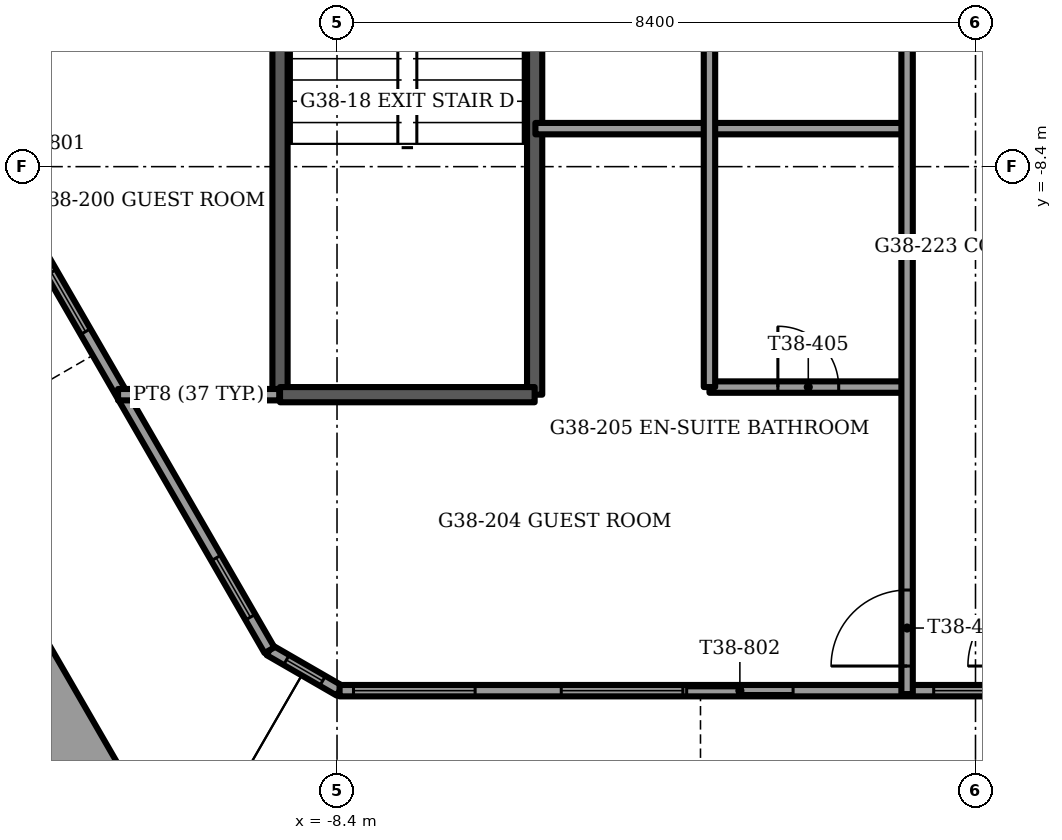
"""IFC4 building model, lengths in metres.
Left out: names, types, materials, properties, quantities, classifications, styles, units other than length and angle.
Written with IfcOpenShell. Run it as: python <this file> out.ifc"""

import sys

from ifc_helpers import new_model, si_unit, direction, frame, frame_2d, origin, place, context, subcontext, project, spatial, rectangle, extrude, element, fill, save


model = new_model("IFC4")
c1 = context("Model", 3, precision=1e-05, world=origin(), true_north=direction((0.0, 1.0)))
c2 = subcontext(c1, "Body", "Model", "MODEL_VIEW")
j1 = project(units=[si_unit("LENGTHUNIT", "METRE"), si_unit("PLANEANGLEUNIT", "RADIAN")], contexts=[c1])
p1 = place(None, origin())
s1 = spatial("IfcSite", under=j1, at=p1, CompositionType="ELEMENT")
p2 = place(p1, origin())
s2 = spatial("IfcBuilding", under=s1, at=p2, CompositionType="ELEMENT")
p3 = place(p2, frame((0.0, 0.0, 157.0)))
s3 = spatial("IfcBuildingStorey", under=s2, at=p3, CompositionType="ELEMENT", Elevation=157.0)
p4 = place(p3, frame((-13.847, -12.715, 0.0), z_axis=(0.0, 0.0, 1.0), x_axis=(0.499969679245, -0.866042908773, 0.0)))
e1 = element("IfcWall", 1, at=p4, inside=s3, PredefinedType="PARAPET", context=c2, shape_type="SweptSolid", body=[
    extrude(rectangle(XDim=5.813, YDim=0.9, at=frame_2d((2.906, 0.0))), origin(), (0.0, 0.0, 1.0), 1.1),
])
p5 = place(p3, frame((-17.428, -0.663, 0.0), z_axis=(0.0, 0.0, 1.0), x_axis=(0.499985985267, -0.866033495043, 0.0)))
e2 = element("IfcWall", 2, at=p5, inside=s3, PredefinedType="SOLIDWALL", context=c2, shape_type="SweptSolid", body=[
    extrude(rectangle(XDim=16.279, YDim=0.15, at=frame_2d((8.14, 0.0))), origin(), (0.0, 0.0, 1.0), 3.45),
])
p6 = place(p5, frame((2.14, 0.0, 0.15)))
e3 = element("IfcOpeningElement", 3, at=p6, cuts=e2, PredefinedType="OPENING", context=c2, shape_type="SweptSolid", body=[
    extrude(rectangle(XDim=0.9, YDim=2.85, at=frame_2d((0.45, 1.425))), frame((0.0, 0.075, 0.0), z_axis=(0.0, -1.0, 0.0), x_axis=(1.0, 0.0, 0.0)), (0.0, 0.0, 1.0), 0.15),
])
p7 = place(p5, frame((4.34, 0.0, 0.15)))
e4 = element("IfcOpeningElement", 4, at=p7, cuts=e2, PredefinedType="OPENING", context=c2, shape_type="SweptSolid", body=[
    extrude(rectangle(XDim=1.4, YDim=2.85, at=frame_2d((0.7, 1.425))), frame((0.0, 0.075, 0.0), z_axis=(0.0, -1.0, 0.0), x_axis=(1.0, 0.0, 0.0)), (0.0, 0.0, 1.0), 0.15),
])
p8 = place(p5, frame((6.833, 0.0, 0.15)))
e5 = element("IfcOpeningElement", 5, at=p8, cuts=e2, PredefinedType="OPENING", context=c2, shape_type="SweptSolid", body=[
    extrude(rectangle(XDim=1.6, YDim=2.85, at=frame_2d((0.8, 1.425))), frame((0.0, 0.075, 0.0), z_axis=(0.0, -1.0, 0.0), x_axis=(1.0, 0.0, 0.0)), (0.0, 0.0, 1.0), 0.15),
])
p9 = place(p5, frame((8.54, 0.0, 0.0)))
e6 = element("IfcOpeningElement", 6, at=p9, cuts=e2, PredefinedType="OPENING", context=c2, shape_type="SweptSolid", body=[
    extrude(rectangle(XDim=1.4, YDim=2.4, at=frame_2d((0.7, 1.2))), frame((0.0, 0.075, 0.0), z_axis=(0.0, -1.0, 0.0), x_axis=(1.0, 0.0, 0.0)), (0.0, 0.0, 1.0), 0.15),
])
p10 = place(p5, frame((10.54, 0.0, 0.15)))
e7 = element("IfcOpeningElement", 7, at=p10, cuts=e2, PredefinedType="OPENING", context=c2, shape_type="SweptSolid", body=[
    extrude(rectangle(XDim=0.9, YDim=2.85, at=frame_2d((0.45, 1.425))), frame((0.0, 0.075, 0.0), z_axis=(0.0, -1.0, 0.0), x_axis=(1.0, 0.0, 0.0)), (0.0, 0.0, 1.0), 0.15),
])
p11 = place(p5, frame((14.877, 0.0, 0.15)))
e8 = element("IfcOpeningElement", 8, at=p11, cuts=e2, PredefinedType="OPENING", context=c2, shape_type="SweptSolid", body=[
    extrude(rectangle(XDim=0.9, YDim=2.73, at=frame_2d((0.45, 1.365))), frame((0.0, 0.075, 0.0), z_axis=(0.0, -1.0, 0.0), x_axis=(1.0, 0.0, 0.0)), (0.0, 0.0, 1.0), 0.15),
])
p12 = place(p3, frame((-8.366, -15.294, 0.0), z_axis=(0.0, 0.0, 1.0), x_axis=(1.0, 0.0, 0.0)))
e9 = element("IfcWall", 9, at=p12, inside=s3, PredefinedType="SOLIDWALL", context=c2, shape_type="SweptSolid", body=[
    extrude(rectangle(XDim=16.732, YDim=0.15, at=frame_2d((8.366, 0.0))), origin(), (0.0, 0.0, 1.0), 3.45),
])
p13 = place(p12, frame((2.916, 0.0, 0.15)))
e10 = element("IfcOpeningElement", 10, at=p13, cuts=e9, PredefinedType="OPENING", context=c2, shape_type="SweptSolid", body=[
    extrude(rectangle(XDim=1.6, YDim=2.85, at=frame_2d((0.8, 1.425))), frame((0.0, 0.075, 0.0), z_axis=(0.0, -1.0, 0.0), x_axis=(1.0, 0.0, 0.0)), (0.0, 0.0, 1.0), 0.15),
])
p14 = place(p12, frame((4.566, 0.0, 0.0)))
e11 = element("IfcOpeningElement", 11, at=p14, cuts=e9, PredefinedType="OPENING", context=c2, shape_type="SweptSolid", body=[
    extrude(rectangle(XDim=1.4, YDim=2.4, at=frame_2d((0.7, 1.2))), frame((0.0, 0.075, 0.0), z_axis=(0.0, -1.0, 0.0), x_axis=(1.0, 0.0, 0.0)), (0.0, 0.0, 1.0), 0.15),
])
p15 = place(p12, frame((7.816, 0.0, 0.15)))
e12 = element("IfcOpeningElement", 12, at=p15, cuts=e9, PredefinedType="OPENING", context=c2, shape_type="SweptSolid", body=[
    extrude(rectangle(XDim=0.9, YDim=2.85, at=frame_2d((0.45, 1.425))), frame((0.0, 0.075, 0.0), z_axis=(0.0, -1.0, 0.0), x_axis=(1.0, 0.0, 0.0)), (0.0, 0.0, 1.0), 0.15),
])
p16 = place(p12, frame((10.766, 0.0, 0.15)))
e13 = element("IfcOpeningElement", 13, at=p16, cuts=e9, PredefinedType="OPENING", context=c2, shape_type="SweptSolid", body=[
    extrude(rectangle(XDim=0.9, YDim=2.85, at=frame_2d((0.45, 1.425))), frame((0.0, 0.075, 0.0), z_axis=(0.0, -1.0, 0.0), x_axis=(1.0, 0.0, 0.0)), (0.0, 0.0, 1.0), 0.15),
])
p17 = place(p12, frame((11.866, 0.0, 0.0)))
e14 = element("IfcOpeningElement", 14, at=p17, cuts=e9, PredefinedType="OPENING", context=c2, shape_type="SweptSolid", body=[
    extrude(rectangle(XDim=1.4, YDim=2.4, at=frame_2d((0.7, 1.2))), frame((0.0, 0.075, 0.0), z_axis=(0.0, -1.0, 0.0), x_axis=(1.0, 0.0, 0.0)), (0.0, 0.0, 1.0), 0.15),
])
p18 = place(p12, frame((0.183, 0.0, 0.15)))
e15 = element("IfcOpeningElement", 15, at=p18, cuts=e9, PredefinedType="OPENING", context=c2, shape_type="SweptSolid", body=[
    extrude(rectangle(XDim=1.6, YDim=2.73, at=frame_2d((0.8, 1.365))), frame((0.0, 0.075, 0.0), z_axis=(0.0, -1.0, 0.0), x_axis=(1.0, 0.0, 0.0)), (0.0, 0.0, 1.0), 0.15),
])
p19 = place(p12, frame((14.949, 0.0, 0.15)))
e16 = element("IfcOpeningElement", 16, at=p19, cuts=e9, PredefinedType="OPENING", context=c2, shape_type="SweptSolid", body=[
    extrude(rectangle(XDim=1.6, YDim=2.73, at=frame_2d((0.8, 1.365))), frame((0.0, 0.075, 0.0), z_axis=(0.0, -1.0, 0.0), x_axis=(1.0, 0.0, 0.0)), (0.0, 0.0, 1.0), 0.15),
])
p20 = place(p3, frame((-9.289, -14.762, 0.0), z_axis=(0.0, 0.0, 1.0), x_axis=(0.866105447774, -0.499861334108, 0.0)))
e17 = element("IfcWall", 17, at=p20, inside=s3, PredefinedType="SOLIDWALL", context=c2, shape_type="SweptSolid", body=[
    extrude(rectangle(XDim=1.065, YDim=0.15, at=frame_2d((0.533, 0.0))), origin(), (0.0, 0.0, 1.0), 3.45),
])
p21 = place(p20, frame((0.258, 0.0, 0.15)))
e18 = element("IfcOpeningElement", 18, at=p21, cuts=e17, PredefinedType="OPENING", context=c2, shape_type="SweptSolid", body=[
    extrude(rectangle(XDim=0.55, YDim=2.85, at=frame_2d((0.275, 1.425))), frame((0.0, 0.075, 0.0), z_axis=(0.0, -1.0, 0.0), x_axis=(1.0, 0.0, 0.0)), (0.0, 0.0, 1.0), 0.15),
])
for number, where, z_axis, x_axis in (
    (19, (-9.15, -3.7, -0.3), (0.0, 0.0, 1.0), (0.0, -1.0, 0.0)),
    (20, (-5.8, -3.7, -0.3), (0.0, 0.0, 1.0), (0.0, -1.0, 0.0)),
):
    element("IfcWall", number, at=place(p3, frame(where, z_axis=z_axis, x_axis=x_axis)), inside=s3, PredefinedType="SOLIDWALL", context=c2, shape_type="SweptSolid", body=[
        extrude(rectangle(XDim=7.7, YDim=0.2, at=frame_2d((3.85, 0.0))), origin(), (0.0, 0.0, 1.0), 3.75),
    ])
p22 = place(p3, frame((-9.15, -11.4, -0.3), z_axis=(0.0, 0.0, 1.0), x_axis=(1.0, 0.0, 0.0)))
e21 = element("IfcWall", 21, at=p22, inside=s3, PredefinedType="SOLIDWALL", context=c2, shape_type="SweptSolid", body=[
    extrude(rectangle(XDim=3.35, YDim=0.2, at=frame_2d((1.675, 0.0))), origin(), (0.0, 0.0, 1.0), 3.75),
])
p23 = place(p3, frame((-11.281, -11.4, 0.0), z_axis=(0.0, 0.0, 1.0), x_axis=(1.0, 0.0, 0.0)))
e22 = element("IfcWall", 22, at=p23, inside=s3, PredefinedType="PARTITIONING", context=c2, shape_type="SweptSolid", body=[
    extrude(rectangle(XDim=2.121, YDim=0.15, at=frame_2d((1.061, 0.0))), origin(), (0.0, 0.0, 1.0), 3.45),
])
p24 = place(p3, frame((-3.5, -11.3, 0.0), z_axis=(0.0, 0.0, 1.0), x_axis=(1.0, 0.0, 0.0)))
e23 = element("IfcWall", 23, at=p24, inside=s3, PredefinedType="PARTITIONING", context=c2, shape_type="SweptSolid", body=[
    extrude(rectangle(XDim=2.6, YDim=0.15, at=frame_2d((1.3, 0.0))), origin(), (0.0, 0.0, 1.0), 3.45),
])
p25 = place(p24, frame((0.9, 0.0, 0.0)))
e24 = element("IfcOpeningElement", 24, at=p25, cuts=e23, PredefinedType="OPENING", context=c2, shape_type="SweptSolid", body=[
    extrude(rectangle(XDim=0.8, YDim=2.1, at=frame_2d((0.4, 1.05))), frame((0.0, 0.075, 0.0), z_axis=(0.0, -1.0, 0.0), x_axis=(1.0, 0.0, 0.0)), (0.0, 0.0, 1.0), 0.15),
])
p26 = place(p3, frame((-5.79, -7.9, 0.0), z_axis=(0.0, 0.0, 1.0), x_axis=(1.0, 0.0, 0.0)))
e25 = element("IfcWall", 25, at=p26, inside=s3, PredefinedType="PARTITIONING", context=c2, shape_type="SweptSolid", body=[
    extrude(rectangle(XDim=4.89, YDim=0.15, at=frame_2d((2.445, 0.0))), origin(), (0.0, 0.0, 1.0), 3.45),
])
p27 = place(p3, frame((-0.9, -15.339, 0.0), z_axis=(0.0, 0.0, 1.0), x_axis=(0.0, 1.0, 0.0)))
e26 = element("IfcWall", 26, at=p27, inside=s3, PredefinedType="PARTITIONING", context=c2, shape_type="SweptSolid", body=[
    extrude(rectangle(XDim=11.639, YDim=0.15, at=frame_2d((5.82, 0.0))), origin(), (0.0, 0.0, 1.0), 3.45),
])
p28 = place(p27, frame((10.389, 0.0, 0.0)))
e27 = element("IfcOpeningElement", 27, at=p28, cuts=e26, PredefinedType="OPENING", context=c2, shape_type="SweptSolid", body=[
    extrude(rectangle(XDim=1.0, YDim=2.1, at=frame_2d((0.5, 1.05))), frame((0.0, 0.075, 0.0), z_axis=(0.0, -1.0, 0.0), x_axis=(1.0, 0.0, 0.0)), (0.0, 0.0, 1.0), 0.15),
])
p29 = place(p27, frame((0.369, 0.0, 0.0)))
e28 = element("IfcOpeningElement", 28, at=p29, cuts=e26, PredefinedType="OPENING", context=c2, shape_type="SweptSolid", body=[
    extrude(rectangle(XDim=1.0, YDim=2.1, at=frame_2d((0.5, 1.05))), frame((0.0, 0.075, 0.0), z_axis=(0.0, -1.0, 0.0), x_axis=(1.0, 0.0, 0.0)), (0.0, 0.0, 1.0), 0.15),
])
p30 = place(p3, frame((-3.5, -11.3, 0.0), z_axis=(0.0, 0.0, 1.0), x_axis=(0.0, 1.0, 0.0)))
e29 = element("IfcWall", 29, at=p30, inside=s3, PredefinedType="PARTITIONING", context=c2, shape_type="SweptSolid", body=[
    extrude(rectangle(XDim=6.2, YDim=0.15, at=frame_2d((3.1, 0.0))), origin(), (0.0, 0.0, 1.0), 3.45),
])
p31 = place(p10, origin())
e30 = element("IfcWindow", 30, at=p31, inside=s3, PartitioningType="SINGLE_PANEL", PredefinedType="WINDOW", context=c2, shape_type="SweptSolid", body=[
    extrude(rectangle(XDim=0.9, YDim=2.85, at=frame_2d((0.45, 1.425))), frame((0.0, 0.03, 0.0), z_axis=(0.0, -1.0, 0.0), x_axis=(1.0, 0.0, 0.0)), (0.0, 0.0, 1.0), 0.06),
])
fill(e7, e30)
p32 = place(p11, origin())
e31 = element("IfcWindow", 31, at=p32, inside=s3, PartitioningType="SINGLE_PANEL", PredefinedType="WINDOW", context=c2, shape_type="SweptSolid", body=[
    extrude(rectangle(XDim=0.9, YDim=2.73, at=frame_2d((0.45, 1.365))), frame((0.0, 0.03, 0.0), z_axis=(0.0, -1.0, 0.0), x_axis=(1.0, 0.0, 0.0)), (0.0, 0.0, 1.0), 0.06),
])
fill(e8, e31)
p33 = place(p13, origin())
e32 = element("IfcWindow", 32, at=p33, inside=s3, PartitioningType="SINGLE_PANEL", PredefinedType="WINDOW", context=c2, shape_type="SweptSolid", body=[
    extrude(rectangle(XDim=1.6, YDim=2.85, at=frame_2d((0.8, 1.425))), frame((0.0, 0.03, 0.0), z_axis=(0.0, -1.0, 0.0), x_axis=(1.0, 0.0, 0.0)), (0.0, 0.0, 1.0), 0.06),
])
fill(e10, e32)
p34 = place(p14, origin())
e33 = element("IfcDoor", 33, at=p34, inside=s3, OperationType="SLIDING_TO_LEFT", PredefinedType="DOOR", context=c2, shape_type="SweptSolid", body=[
    extrude(rectangle(XDim=1.4, YDim=2.4, at=frame_2d((0.7, 1.2))), frame((0.0, 0.025, 0.0), z_axis=(0.0, -1.0, 0.0), x_axis=(1.0, 0.0, 0.0)), (0.0, 0.0, 1.0), 0.05),
])
fill(e11, e33)
p35 = place(p15, origin())
e34 = element("IfcWindow", 34, at=p35, inside=s3, PartitioningType="SINGLE_PANEL", PredefinedType="WINDOW", context=c2, shape_type="SweptSolid", body=[
    extrude(rectangle(XDim=0.9, YDim=2.85, at=frame_2d((0.45, 1.425))), frame((0.0, 0.03, 0.0), z_axis=(0.0, -1.0, 0.0), x_axis=(1.0, 0.0, 0.0)), (0.0, 0.0, 1.0), 0.06),
])
fill(e12, e34)
p36 = place(p18, origin())
e35 = element("IfcWindow", 35, at=p36, inside=s3, PartitioningType="SINGLE_PANEL", PredefinedType="WINDOW", context=c2, shape_type="SweptSolid", body=[
    extrude(rectangle(XDim=1.6, YDim=2.73, at=frame_2d((0.8, 1.365))), frame((0.0, 0.03, 0.0), z_axis=(0.0, -1.0, 0.0), x_axis=(1.0, 0.0, 0.0)), (0.0, 0.0, 1.0), 0.06),
])
fill(e15, e35)
p37 = place(p21, origin())
e36 = element("IfcWindow", 36, at=p37, inside=s3, PartitioningType="SINGLE_PANEL", PredefinedType="WINDOW", context=c2, shape_type="SweptSolid", body=[
    extrude(rectangle(XDim=0.55, YDim=2.85, at=frame_2d((0.275, 1.425))), frame((0.0, 0.03, 0.0), z_axis=(0.0, -1.0, 0.0), x_axis=(1.0, 0.0, 0.0)), (0.0, 0.0, 1.0), 0.06),
])
fill(e18, e36)
p38 = place(p29, origin())
e37 = element("IfcDoor", 37, at=p38, inside=s3, OperationType="SINGLE_SWING_LEFT", PredefinedType="DOOR", context=c2, shape_type="SweptSolid", body=[
    extrude(rectangle(XDim=1.0, YDim=2.1, at=frame_2d((0.5, 1.05))), frame((0.0, 0.025, 0.0), z_axis=(0.0, -1.0, 0.0), x_axis=(1.0, 0.0, 0.0)), (0.0, 0.0, 1.0), 0.05),
])
fill(e28, e37)
p39 = place(p25, origin())
e38 = element("IfcDoor", 38, at=p39, inside=s3, OperationType="SINGLE_SWING_RIGHT", PredefinedType="DOOR", context=c2, shape_type="SweptSolid", body=[
    extrude(rectangle(XDim=0.8, YDim=2.1, at=frame_2d((0.4, 1.05))), frame((0.0, 0.025, 0.0), z_axis=(0.0, -1.0, 0.0), x_axis=(1.0, 0.0, 0.0)), (0.0, 0.0, 1.0), 0.05),
])
fill(e24, e38)
save(model, sys.argv[1])
